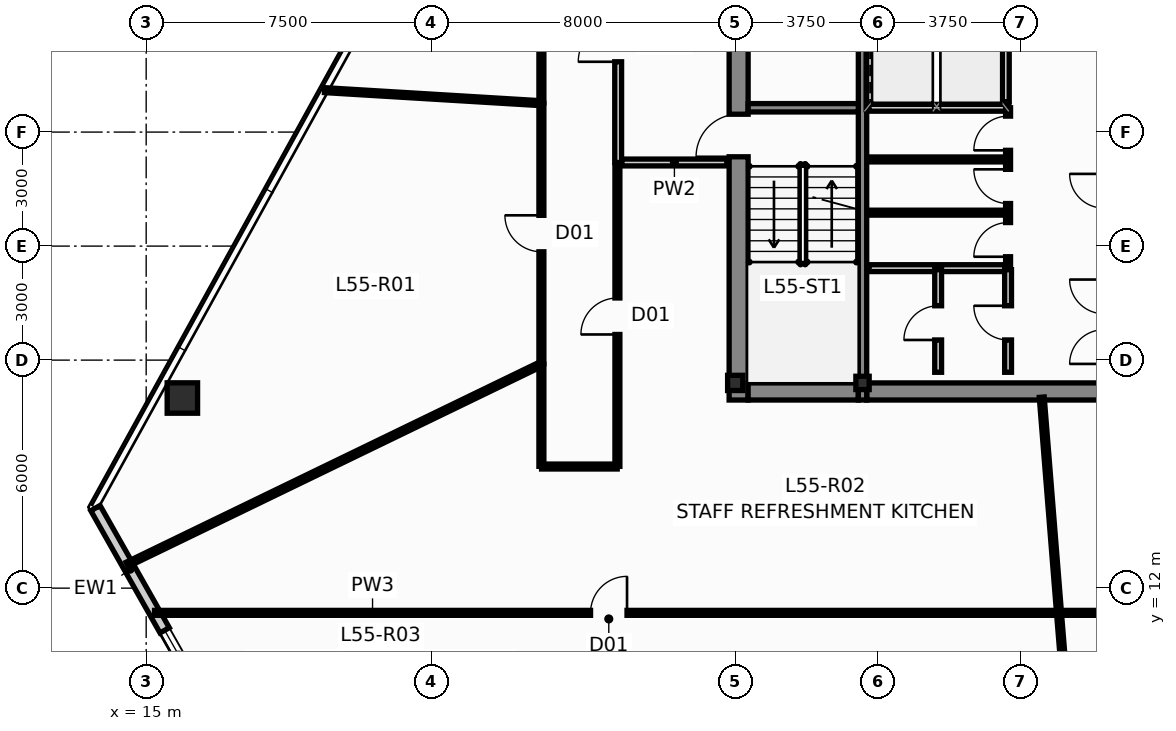
"""IFC4 building model, lengths in metres.
Left out: names, types, materials, properties, quantities, classifications, styles, units other than length and angle.
Written with IfcOpenShell. Run it as: python <this file> out.ifc"""

import sys

from ifc_helpers import new_model, si_unit, direction, frame, frame_2d, origin, origin_2d, place, context, subcontext, project, spatial, rectangle, hollow_rectangle, i_section, extrude, source, transform, mapped, element, fill, save


model = new_model("IFC4")
c1 = context("Model", 3, precision=1e-05, world=origin(), true_north=direction((0.0, 1.0)))
c2 = subcontext(c1, "Body", "Model", "MODEL_VIEW")
j1 = project(units=[si_unit("LENGTHUNIT", "METRE"), si_unit("PLANEANGLEUNIT", "RADIAN")], contexts=[c1])
p1 = place(None, origin())
s1 = spatial("IfcSite", under=j1, at=p1, CompositionType="ELEMENT")
p2 = place(p1, origin())
s2 = spatial("IfcBuilding", under=s1, at=p2, CompositionType="ELEMENT")
p3 = place(p2, frame((0.0, 0.0, 209.6)))
s3 = spatial("IfcBuildingStorey", under=s2, at=p3, CompositionType="ELEMENT", Elevation=209.6)
m1 = source(origin(), c2, "Body", "SweptSolid", [
    extrude(i_section(OverallWidth=0.4, OverallDepth=0.4, WebThickness=0.02, FlangeThickness=0.032, at=origin_2d()), origin(), (0.0, 0.0, 1.0), 3.65),
])
p4 = place(p3, frame((30.5, 17.4, 0.0), z_axis=(0.0, 0.0, 1.0), x_axis=(1.0, 0.0, 0.0)))
e1 = element("IfcColumn", 1, at=p4, inside=s3, PredefinedType="COLUMN", context=c2, shape_type="MappedRepresentation", body=[
    mapped(m1, transform((0.0, 0.0, 0.0), scale=1.0)),
])
m2 = source(origin(), c2, "Body", "SweptSolid", [
    extrude(hollow_rectangle(XDim=0.35, YDim=0.35, WallThickness=0.016, at=origin_2d()), origin(), (0.0, 0.0, 1.0), 3.65),
])
p5 = place(p3, frame((33.85, 17.4, 0.0), z_axis=(0.0, 0.0, 1.0), x_axis=(1.0, 0.0, 0.0)))
e2 = element("IfcColumn", 2, at=p5, inside=s3, PredefinedType="COLUMN", context=c2, shape_type="MappedRepresentation", body=[
    mapped(m2, transform((0.0, 0.0, 0.0), scale=1.0)),
])
p6 = place(p3, frame((30.59, 16.95, 0.0), z_axis=(0.0, 0.0, 1.0), x_axis=(0.0, 1.0, 0.0)))
e3 = element("IfcWall", 3, at=p6, inside=s3, PredefinedType="SHEAR", context=c2, shape_type="SweptSolid", body=[
    extrude(rectangle(XDim=13.275, YDim=0.5, at=frame_2d((6.638, 0.0))), origin(), (0.0, 0.0, 1.0), 3.65),
])
p7 = place(p6, frame((6.4, 0.0, 0.0)))
e4 = element("IfcOpeningElement", 4, at=p7, cuts=e3, PredefinedType="OPENING", context=c2, shape_type="SweptSolid", body=[
    extrude(rectangle(XDim=1.12, YDim=2.15, at=frame_2d((0.56, 1.075))), frame((0.0, 0.262, 0.0), z_axis=(0.0, -1.0, 0.0), x_axis=(1.0, 0.0, 0.0)), (0.0, 0.0, 1.0), 0.524),
])
p8 = place(p6, frame((10.85, 0.0, 0.0)))
e5 = element("IfcOpeningElement", 5, at=p8, cuts=e3, PredefinedType="OPENING", context=c2, shape_type="SweptSolid", body=[
    extrude(rectangle(XDim=1.2, YDim=2.2, at=frame_2d((0.6, 1.1))), frame((0.0, 0.262, 0.0), z_axis=(0.0, -1.0, 0.0), x_axis=(1.0, 0.0, 0.0)), (0.0, 0.0, 1.0), 0.524),
])
p9 = place(p3, frame((30.84, 17.175, 0.0), z_axis=(0.0, 0.0, 1.0), x_axis=(1.0, 0.0, 0.0)))
e6 = element("IfcWall", 6, at=p9, inside=s3, PredefinedType="SHEAR", context=c2, shape_type="SweptSolid", body=[
    extrude(rectangle(XDim=2.9, YDim=0.45, at=frame_2d((1.45, 0.0))), origin(), (0.0, 0.0, 1.0), 3.65),
])
p10 = place(p3, frame((33.96, 17.175, 0.0), z_axis=(0.0, 0.0, 1.0), x_axis=(1.0, 0.0, 0.0)))
e7 = element("IfcWall", 7, at=p10, inside=s3, PredefinedType="SHEAR", context=c2, shape_type="SweptSolid", body=[
    extrude(rectangle(XDim=8.08, YDim=0.45, at=frame_2d((4.04, 0.0))), origin(), (0.0, 0.0, 1.0), 3.65),
])
p11 = place(p3, frame((33.85, 16.95, 0.0), z_axis=(0.0, 0.0, 1.0), x_axis=(0.0, 1.0, 0.0)))
e8 = element("IfcWall", 8, at=p11, inside=s3, PredefinedType="SHEAR", context=c2, shape_type="SweptSolid", body=[
    extrude(rectangle(XDim=13.275, YDim=0.22, at=frame_2d((6.638, 0.0))), origin(), (0.0, 0.0, 1.0), 3.65),
])
p12 = place(p3, frame((30.84, 24.64, 0.0), z_axis=(0.0, 0.0, 1.0), x_axis=(1.0, 0.0, 0.0)))
e9 = element("IfcWall", 9, at=p12, inside=s3, PredefinedType="SHEAR", context=c2, shape_type="SweptSolid", body=[
    extrude(rectangle(XDim=2.9, YDim=0.22, at=frame_2d((1.45, 0.0))), origin(), (0.0, 0.0, 1.0), 3.65),
])
m3 = source(origin(), c2, "Body", "SweptSolid", [
    extrude(hollow_rectangle(XDim=0.8, YDim=0.8, WallThickness=0.045, at=origin_2d()), origin(), (0.0, 0.0, 1.0), 3.651),
])
p13 = place(p3, frame((15.952, 17.003, 0.0), z_axis=(0.010431795422, -0.021532295679, 0.999713727968), x_axis=(0.899947055326, 0.435999194506, 0.0)))
e10 = element("IfcColumn", 10, at=p13, inside=s3, PredefinedType="COLUMN", context=c2, shape_type="MappedRepresentation", body=[
    mapped(m3, transform((0.0, 0.0, 0.0), scale=1.0)),
])
p14 = place(p3, frame((17.162, 7.932, 0.0), z_axis=(0.0, 0.0, 1.0), x_axis=(-0.492885817922, 0.870094000951, 0.0)))
e11 = element("IfcWall", 11, at=p14, inside=s3, PredefinedType="STANDARD", context=c2, shape_type="SweptSolid", body=[
    extrude(rectangle(XDim=7.096, YDim=0.28, at=frame_2d((3.548, 0.0))), origin(), (0.0, 0.0, 1.0), 3.4),
])
p15 = place(p14, frame((1.9, 0.0, 0.9)))
e12 = element("IfcOpeningElement", 12, at=p15, cuts=e11, PredefinedType="OPENING", context=c2, shape_type="SweptSolid", body=[
    extrude(rectangle(XDim=1.5, YDim=1.8, at=frame_2d((0.75, 0.9))), frame((0.0, 0.152, 0.0), z_axis=(0.0, -1.0, 0.0), x_axis=(1.0, 0.0, 0.0)), (0.0, 0.0, 1.0), 0.304),
])
p16 = place(p3, frame((37.62, 24.8, 0.0), z_axis=(0.0, 0.0, 1.0), x_axis=(0.0, 1.0, 0.0)))
e13 = element("IfcWall", 13, at=p16, inside=s3, PredefinedType="PARTITIONING", context=c2, shape_type="SweptSolid", body=[
    extrude(rectangle(XDim=2.0, YDim=0.18, at=frame_2d((1.0, 0.0))), origin(), (0.0, 0.0, 1.0), 3.4),
])
p17 = place(p3, frame((34.02, 24.64, 0.0), z_axis=(0.0, 0.0, 1.0), x_axis=(1.0, 0.0, 0.0)))
e14 = element("IfcWall", 14, at=p17, inside=s3, PredefinedType="PARTITIONING", context=c2, shape_type="SweptSolid", body=[
    extrude(rectangle(XDim=3.68, YDim=0.18, at=frame_2d((1.84, 0.0))), origin(), (0.0, 0.0, 1.0), 3.4),
])
p18 = place(p3, frame((27.42, 23.2, 0.0), z_axis=(0.0, 0.0, 1.0), x_axis=(0.0, 1.0, 0.0)))
e15 = element("IfcWall", 15, at=p18, inside=s3, PredefinedType="PARTITIONING", context=c2, shape_type="SweptSolid", body=[
    extrude(rectangle(XDim=6.4, YDim=0.18, at=frame_2d((3.2, 0.0))), origin(), (0.0, 0.0, 1.0), 3.078),
])
p19 = place(p18, frame((2.65, 0.0, 0.0)))
e16 = element("IfcOpeningElement", 16, at=p19, cuts=e15, PredefinedType="OPENING", context=c2, shape_type="SweptSolid", body=[
    extrude(rectangle(XDim=1.05, YDim=2.15, at=frame_2d((0.525, 1.075))), frame((0.0, 0.102, 0.0), z_axis=(0.0, -1.0, 0.0), x_axis=(1.0, 0.0, 0.0)), (0.0, 0.0, 1.0), 0.204),
])
p20 = place(p3, frame((27.52, 23.2, 0.0), z_axis=(0.0, 0.0, 1.0), x_axis=(1.0, 0.0, 0.0)))
e17 = element("IfcWall", 17, at=p20, inside=s3, PredefinedType="PARTITIONING", context=c2, shape_type="SweptSolid", body=[
    extrude(rectangle(XDim=2.76, YDim=0.18, at=frame_2d((1.38, 0.0))), origin(), (0.0, 0.0, 1.0), 3.4),
])
p21 = place(p3, frame((34.02, 20.42, 0.0), z_axis=(0.0, 0.0, 1.0), x_axis=(1.0, 0.0, 0.0)))
e18 = element("IfcWall", 18, at=p21, inside=s3, PredefinedType="PARTITIONING", context=c2, shape_type="SweptSolid", body=[
    extrude(rectangle(XDim=3.64, YDim=0.18, at=frame_2d((1.82, 0.0))), origin(), (0.0, 0.0, 1.0), 3.4),
])
for number, where, z_axis, x_axis in (
    (19, (34.02, 21.88, 0.0), (0.0, 0.0, 1.0), (1.0, 0.0, 0.0)),
    (20, (34.02, 23.28, 0.0), (0.0, 0.0, 1.0), (1.0, 0.0, 0.0)),
):
    element("IfcWall", number, at=place(p3, frame(where, z_axis=z_axis, x_axis=x_axis)), inside=s3, PredefinedType="PARTITIONING", context=c2, shape_type="SweptSolid", body=[
        extrude(rectangle(XDim=3.58, YDim=0.13, at=frame_2d((1.79, 0.0))), origin(), (0.0, 0.0, 1.0), 3.4),
    ])
p22 = place(p3, frame((37.68, 20.5, 0.0), z_axis=(0.0, 0.0, 1.0), x_axis=(0.0, 1.0, 0.0)))
e21 = element("IfcWall", 21, at=p22, inside=s3, PredefinedType="PARTITIONING", context=c2, shape_type="SweptSolid", body=[
    extrude(rectangle(XDim=4.14, YDim=0.13, at=frame_2d((2.07, 0.0))), origin(), (0.0, 0.0, 1.0), 3.4),
])
p23 = place(p22, frame((0.22, 0.0, 0.0)))
e22 = element("IfcOpeningElement", 22, at=p23, cuts=e21, PredefinedType="OPENING", context=c2, shape_type="SweptSolid", body=[
    extrude(rectangle(XDim=0.9, YDim=2.1, at=frame_2d((0.45, 1.05))), frame((0.0, 0.077, 0.0), z_axis=(0.0, -1.0, 0.0), x_axis=(1.0, 0.0, 0.0)), (0.0, 0.0, 1.0), 0.154),
])
p24 = place(p22, frame((1.62, 0.0, 0.0)))
e23 = element("IfcOpeningElement", 23, at=p24, cuts=e21, PredefinedType="OPENING", context=c2, shape_type="SweptSolid", body=[
    extrude(rectangle(XDim=0.9, YDim=2.1, at=frame_2d((0.45, 1.05))), frame((0.0, 0.077, 0.0), z_axis=(0.0, -1.0, 0.0), x_axis=(1.0, 0.0, 0.0)), (0.0, 0.0, 1.0), 0.154),
])
p25 = place(p22, frame((3.02, 0.0, 0.0)))
e24 = element("IfcOpeningElement", 24, at=p25, cuts=e21, PredefinedType="OPENING", context=c2, shape_type="SweptSolid", body=[
    extrude(rectangle(XDim=0.9, YDim=2.1, at=frame_2d((0.45, 1.05))), frame((0.0, 0.077, 0.0), z_axis=(0.0, -1.0, 0.0), x_axis=(1.0, 0.0, 0.0)), (0.0, 0.0, 1.0), 0.154),
])
p26 = place(p3, frame((35.84, 17.68, 0.0), z_axis=(0.0, 0.0, 1.0), x_axis=(0.0, 1.0, 0.0)))
e25 = element("IfcWall", 25, at=p26, inside=s3, PredefinedType="PARTITIONING", context=c2, shape_type="SweptSolid", body=[
    extrude(rectangle(XDim=2.7, YDim=0.18, at=frame_2d((1.35, 0.0))), origin(), (0.0, 0.0, 1.0), 3.4),
])
p27 = place(p26, frame((0.85, 0.0, 0.0)))
e26 = element("IfcOpeningElement", 26, at=p27, cuts=e25, PredefinedType="OPENING", context=c2, shape_type="SweptSolid", body=[
    extrude(rectangle(XDim=0.9, YDim=2.1, at=frame_2d((0.45, 1.05))), frame((0.0, 0.102, 0.0), z_axis=(0.0, -1.0, 0.0), x_axis=(1.0, 0.0, 0.0)), (0.0, 0.0, 1.0), 0.204),
])
p28 = place(p3, frame((37.68, 17.68, 0.0), z_axis=(0.0, 0.0, 1.0), x_axis=(0.0, 1.0, 0.0)))
e27 = element("IfcWall", 27, at=p28, inside=s3, PredefinedType="PARTITIONING", context=c2, shape_type="SweptSolid", body=[
    extrude(rectangle(XDim=2.7, YDim=0.18, at=frame_2d((1.35, 0.0))), origin(), (0.0, 0.0, 1.0), 3.4),
])
p29 = place(p28, frame((0.85, 0.0, 0.0)))
e28 = element("IfcOpeningElement", 28, at=p29, cuts=e27, PredefinedType="OPENING", context=c2, shape_type="SweptSolid", body=[
    extrude(rectangle(XDim=0.9, YDim=2.1, at=frame_2d((0.45, 1.05))), frame((0.0, 0.102, 0.0), z_axis=(0.0, -1.0, 0.0), x_axis=(1.0, 0.0, 0.0)), (0.0, 0.0, 1.0), 0.204),
])
p30 = place(p3, frame((15.22, 11.35, 0.0), z_axis=(0.0, 0.0, 1.0), x_axis=(1.0, 0.0, 0.0)))
e29 = element("IfcWall", 29, at=p30, inside=s3, PredefinedType="PARTITIONING", context=c2, shape_type="SweptSolid", body=[
    extrude(rectangle(XDim=23.795, YDim=0.13, at=frame_2d((11.897, 0.0))), origin(), (0.0, 0.0, 1.0), 3.078),
])
p31 = place(p30, frame((11.473, 0.0, 0.0)))
e30 = element("IfcOpeningElement", 30, at=p31, cuts=e29, PredefinedType="OPENING", context=c2, shape_type="SweptSolid", body=[
    extrude(rectangle(XDim=0.96, YDim=2.15, at=frame_2d((0.48, 1.075))), frame((0.0, 0.077, 0.0), z_axis=(0.0, -1.0, 0.0), x_axis=(1.0, 0.0, 0.0)), (0.0, 0.0, 1.0), 0.154),
])
p32 = place(p3, frame((39.025, 11.35, 0.0), z_axis=(0.0, 0.0, 1.0), x_axis=(1.0, 0.0, 0.0)))
e31 = element("IfcWall", 31, at=p32, inside=s3, PredefinedType="PARTITIONING", context=c2, shape_type="SweptSolid", body=[
    extrude(rectangle(XDim=12.56, YDim=0.13, at=frame_2d((6.28, 0.0))), origin(), (0.0, 0.0, 1.0), 3.078),
])
p33 = place(p32, frame((5.8, 0.0, 0.0)))
e32 = element("IfcOpeningElement", 32, at=p33, cuts=e31, PredefinedType="OPENING", context=c2, shape_type="SweptSolid", body=[
    extrude(rectangle(XDim=0.96, YDim=2.15, at=frame_2d((0.48, 1.075))), frame((0.0, 0.077, 0.0), z_axis=(0.0, -1.0, 0.0), x_axis=(1.0, 0.0, 0.0)), (0.0, 0.0, 1.0), 0.154),
])
p34 = place(p3, frame((14.499, 12.623, 0.0), z_axis=(0.0, 0.0, 1.0), x_axis=(0.90007735985, 0.43573013011, 0.0)))
e33 = element("IfcWall", 33, at=p34, inside=s3, PredefinedType="PARTITIONING", context=c2, shape_type="SweptSolid", body=[
    extrude(rectangle(XDim=12.106, YDim=0.13, at=frame_2d((6.053, 0.0))), origin(), (0.0, 0.0, 1.0), 3.4),
])
p35 = place(p3, frame((27.4, 15.205, 0.0), z_axis=(0.0, 0.0, 1.0), x_axis=(0.0, 1.0, 0.0)))
e34 = element("IfcWall", 34, at=p35, inside=s3, PredefinedType="PARTITIONING", context=c2, shape_type="SweptSolid", body=[
    extrude(rectangle(XDim=7.9, YDim=0.13, at=frame_2d((3.95, 0.0))), origin(), (0.0, 0.0, 1.0), 3.078),
])
p36 = place(p35, frame((3.47, 0.0, 0.0)))
e35 = element("IfcOpeningElement", 35, at=p36, cuts=e34, PredefinedType="OPENING", context=c2, shape_type="SweptSolid", body=[
    extrude(rectangle(XDim=0.96, YDim=2.15, at=frame_2d((0.48, 1.075))), frame((0.0, 0.077, 0.0), z_axis=(0.0, -1.0, 0.0), x_axis=(1.0, 0.0, 0.0)), (0.0, 0.0, 1.0), 0.154),
])
p37 = place(p3, frame((25.4, 17.905, 0.0), z_axis=(0.0, 0.0, 1.0), x_axis=(0.0, 1.0, 0.0)))
e36 = element("IfcWall", 36, at=p37, inside=s3, PredefinedType="PARTITIONING", context=c2, shape_type="SweptSolid", body=[
    extrude(rectangle(XDim=6.85, YDim=0.13, at=frame_2d((3.425, 0.0))), origin(), (0.0, 0.0, 1.0), 3.078),
])
p38 = place(p37, frame((2.945, 0.0, 0.0)))
e37 = element("IfcOpeningElement", 37, at=p38, cuts=e36, PredefinedType="OPENING", context=c2, shape_type="SweptSolid", body=[
    extrude(rectangle(XDim=0.96, YDim=2.15, at=frame_2d((0.48, 1.075))), frame((0.0, 0.077, 0.0), z_axis=(0.0, -1.0, 0.0), x_axis=(1.0, 0.0, 0.0)), (0.0, 0.0, 1.0), 0.154),
])
p39 = place(p3, frame((19.696, 25.104, 0.0), z_axis=(0.0, 0.0, 1.0), x_axis=(0.998188240426, -0.060168402634, 0.0)))
e38 = element("IfcWall", 38, at=p39, inside=s3, PredefinedType="PARTITIONING", context=c2, shape_type="SweptSolid", body=[
    extrude(rectangle(XDim=5.709, YDim=0.13, at=frame_2d((2.854, 0.0))), origin(), (0.0, 0.0, 1.0), 3.4),
])
p40 = place(p3, frame((38.566, 17.025, 0.0), z_axis=(0.0, 0.0, 1.0), x_axis=(0.079833930884, -0.996808177876, 0.0)))
e39 = element("IfcWall", 39, at=p40, inside=s3, PredefinedType="PARTITIONING", context=c2, shape_type="SweptSolid", body=[
    extrude(rectangle(XDim=5.688, YDim=0.13, at=frame_2d((2.844, 0.0))), origin(), (0.0, 0.0, 1.0), 3.4),
])
p41 = place(p3, frame((25.4, 30.095, 0.0), z_axis=(0.0, 0.0, 1.0), x_axis=(0.0, -1.0, 0.0)))
e40 = element("IfcWall", 40, at=p41, inside=s3, PredefinedType="PARTITIONING", context=c2, shape_type="SweptSolid", body=[
    extrude(rectangle(XDim=5.33, YDim=0.13, at=frame_2d((2.665, 0.0))), origin(), (0.0, 0.0, 1.0), 3.078),
])
p42 = place(p3, frame((39.02, 11.345, 0.0), z_axis=(0.0, 0.0, 1.0), x_axis=(0.081416716871, -0.9966801484, 0.0)))
e41 = element("IfcWall", 41, at=p42, inside=s3, PredefinedType="PARTITIONING", context=c2, shape_type="SweptSolid", body=[
    extrude(rectangle(XDim=3.709, YDim=0.13, at=frame_2d((1.854, 0.0))), origin(), (0.0, 0.0, 1.0), 3.4),
])
p43 = place(p3, frame((25.4, 17.895, 0.0), z_axis=(0.0, 0.0, 1.0), x_axis=(0.0, -1.0, 0.0)))
e42 = element("IfcWall", 42, at=p43, inside=s3, PredefinedType="PARTITIONING", context=c2, shape_type="SweptSolid", body=[
    extrude(rectangle(XDim=2.69, YDim=0.13, at=frame_2d((1.345, 0.0))), origin(), (0.0, 0.0, 1.0), 3.4),
])
p44 = place(p3, frame((25.405, 15.2, 0.0), z_axis=(0.0, 0.0, 1.0), x_axis=(1.0, 0.0, 0.0)))
e43 = element("IfcWall", 43, at=p44, inside=s3, PredefinedType="PARTITIONING", context=c2, shape_type="SweptSolid", body=[
    extrude(rectangle(XDim=1.99, YDim=0.13, at=frame_2d((0.995, 0.0))), origin(), (0.0, 0.0, 1.0), 3.4),
])
p45 = place(p15, origin())
e44 = element("IfcWindow", 44, at=p45, inside=s3, PartitioningType="SINGLE_PANEL", PredefinedType="WINDOW", context=c2, shape_type="SweptSolid", body=[
    extrude(rectangle(XDim=1.5, YDim=1.8, at=frame_2d((0.75, 0.9))), frame((0.0, 0.03, 0.0), z_axis=(0.0, -1.0, 0.0), x_axis=(1.0, 0.0, 0.0)), (0.0, 0.0, 1.0), 0.06),
])
fill(e12, e44)
p46 = place(p7, origin())
e45 = element("IfcDoor", 45, at=p46, inside=s3, OperationType="SINGLE_SWING_LEFT", PredefinedType="DOOR", context=c2, shape_type="SweptSolid", body=[
    extrude(rectangle(XDim=1.12, YDim=2.15, at=frame_2d((0.56, 1.075))), frame((0.0, 0.025, 0.0), z_axis=(0.0, -1.0, 0.0), x_axis=(1.0, 0.0, 0.0)), (0.0, 0.0, 1.0), 0.05),
])
fill(e4, e45)
p47 = place(p19, origin())
e46 = element("IfcDoor", 46, at=p47, inside=s3, OperationType="SINGLE_SWING_LEFT", PredefinedType="DOOR", context=c2, shape_type="SweptSolid", body=[
    extrude(rectangle(XDim=1.05, YDim=2.15, at=frame_2d((0.525, 1.075))), frame((0.0, 0.025, 0.0), z_axis=(0.0, -1.0, 0.0), x_axis=(1.0, 0.0, 0.0)), (0.0, 0.0, 1.0), 0.05),
])
fill(e16, e46)
p48 = place(p23, origin())
e47 = element("IfcDoor", 47, at=p48, inside=s3, OperationType="SINGLE_SWING_LEFT", PredefinedType="DOOR", context=c2, shape_type="SweptSolid", body=[
    extrude(rectangle(XDim=0.9, YDim=2.1, at=frame_2d((0.45, 1.05))), frame((0.0, 0.025, 0.0), z_axis=(0.0, -1.0, 0.0), x_axis=(1.0, 0.0, 0.0)), (0.0, 0.0, 1.0), 0.05),
])
fill(e22, e47)
p49 = place(p24, origin())
e48 = element("IfcDoor", 48, at=p49, inside=s3, OperationType="SINGLE_SWING_RIGHT", PredefinedType="DOOR", context=c2, shape_type="SweptSolid", body=[
    extrude(rectangle(XDim=0.9, YDim=2.1, at=frame_2d((0.45, 1.05))), frame((0.0, 0.025, 0.0), z_axis=(0.0, -1.0, 0.0), x_axis=(1.0, 0.0, 0.0)), (0.0, 0.0, 1.0), 0.05),
])
fill(e23, e48)
p50 = place(p25, origin())
e49 = element("IfcDoor", 49, at=p50, inside=s3, OperationType="SINGLE_SWING_LEFT", PredefinedType="DOOR", context=c2, shape_type="SweptSolid", body=[
    extrude(rectangle(XDim=0.9, YDim=2.1, at=frame_2d((0.45, 1.05))), frame((0.0, 0.025, 0.0), z_axis=(0.0, -1.0, 0.0), x_axis=(1.0, 0.0, 0.0)), (0.0, 0.0, 1.0), 0.05),
])
fill(e24, e49)
p51 = place(p27, origin())
e50 = element("IfcDoor", 50, at=p51, inside=s3, OperationType="SINGLE_SWING_LEFT", PredefinedType="DOOR", context=c2, shape_type="SweptSolid", body=[
    extrude(rectangle(XDim=0.9, YDim=2.1, at=frame_2d((0.45, 1.05))), frame((0.0, 0.025, 0.0), z_axis=(0.0, -1.0, 0.0), x_axis=(1.0, 0.0, 0.0)), (0.0, 0.0, 1.0), 0.05),
])
fill(e26, e50)
p52 = place(p29, origin())
e51 = element("IfcDoor", 51, at=p52, inside=s3, OperationType="SINGLE_SWING_RIGHT", PredefinedType="DOOR", context=c2, shape_type="SweptSolid", body=[
    extrude(rectangle(XDim=0.9, YDim=2.1, at=frame_2d((0.45, 1.05))), frame((0.0, 0.025, 0.0), z_axis=(0.0, -1.0, 0.0), x_axis=(1.0, 0.0, 0.0)), (0.0, 0.0, 1.0), 0.05),
])
fill(e28, e51)
p53 = place(p31, origin())
e52 = element("IfcDoor", 52, at=p53, inside=s3, OperationType="SINGLE_SWING_RIGHT", PredefinedType="DOOR", context=c2, shape_type="SweptSolid", body=[
    extrude(rectangle(XDim=0.96, YDim=2.15, at=frame_2d((0.48, 1.075))), frame((0.0, 0.025, 0.0), z_axis=(0.0, -1.0, 0.0), x_axis=(1.0, 0.0, 0.0)), (0.0, 0.0, 1.0), 0.05),
])
fill(e30, e52)
p54 = place(p36, origin())
e53 = element("IfcDoor", 53, at=p54, inside=s3, OperationType="SINGLE_SWING_LEFT", PredefinedType="DOOR", context=c2, shape_type="SweptSolid", body=[
    extrude(rectangle(XDim=0.96, YDim=2.15, at=frame_2d((0.48, 1.075))), frame((0.0, 0.025, 0.0), z_axis=(0.0, -1.0, 0.0), x_axis=(1.0, 0.0, 0.0)), (0.0, 0.0, 1.0), 0.05),
])
fill(e35, e53)
p55 = place(p38, origin())
e54 = element("IfcDoor", 54, at=p55, inside=s3, OperationType="SINGLE_SWING_RIGHT", PredefinedType="DOOR", context=c2, shape_type="SweptSolid", body=[
    extrude(rectangle(XDim=0.96, YDim=2.15, at=frame_2d((0.48, 1.075))), frame((0.0, 0.025, 0.0), z_axis=(0.0, -1.0, 0.0), x_axis=(1.0, 0.0, 0.0)), (0.0, 0.0, 1.0), 0.05),
])
fill(e37, e54)
save(model, sys.argv[1])
